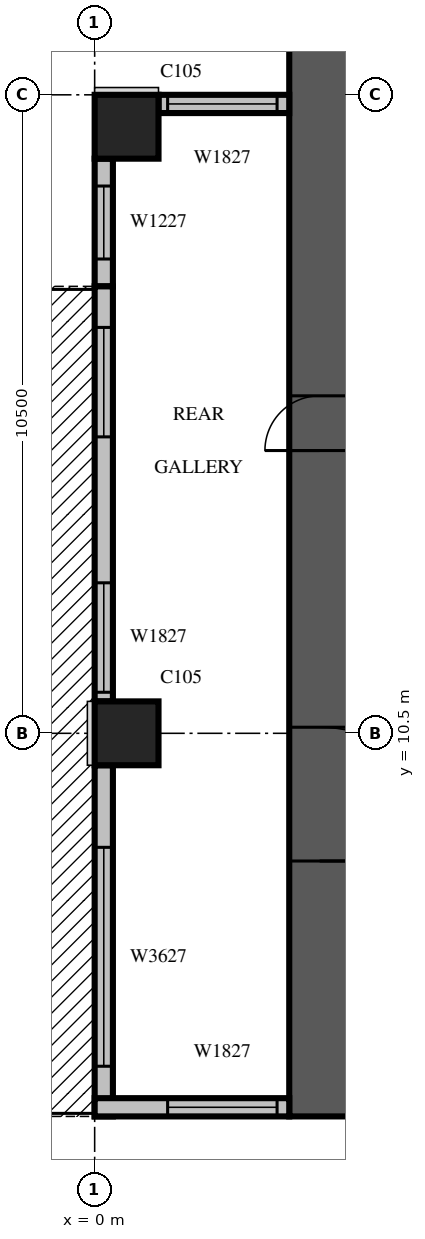
"""IFC4 building model, lengths in metres.
Left out: names, types, materials, properties, quantities, classifications, styles, units other than length and angle.
Written with IfcOpenShell. Run it as: python <this file> out.ifc"""

import sys

from ifc_helpers import new_model, si_unit, direction, frame, frame_2d, origin, origin_2d, place, context, subcontext, project, spatial, rectangle, extrude, source, transform, mapped, element, fill, save


model = new_model("IFC4")
c1 = context("Model", 3, precision=1e-05, world=origin(), true_north=direction((0.0, 1.0)))
c2 = subcontext(c1, "Body", "Model", "MODEL_VIEW")
j1 = project(units=[si_unit("LENGTHUNIT", "METRE"), si_unit("PLANEANGLEUNIT", "RADIAN")], contexts=[c1])
p1 = place(None, origin())
s1 = spatial("IfcSite", under=j1, at=p1, CompositionType="ELEMENT")
p2 = place(p1, origin())
s2 = spatial("IfcBuilding", under=s1, at=p2, CompositionType="ELEMENT")
p3 = place(p2, frame((0.0, 0.0, 124.5)))
s3 = spatial("IfcBuildingStorey", under=s2, at=p3, CompositionType="ELEMENT", Elevation=124.5)
m1 = source(origin(), c2, "Body", "SweptSolid", [
    extrude(rectangle(XDim=1.05, YDim=1.05, at=origin_2d()), origin(), (0.0, 0.0, 1.0), 4.2),
])
for number, where, z_axis, x_axis in (
    (1, (0.525, 10.5, 0.0), (0.0, 0.0, 1.0), (1.0, 0.0, 0.0)),
    (2, (0.525, 20.475, 0.0), (0.0, 0.0, 1.0), (1.0, 0.0, 0.0)),
):
    element("IfcColumn", number, at=place(p3, frame(where, z_axis=z_axis, x_axis=x_axis)), inside=s3, PredefinedType="COLUMN", context=c2, shape_type="MappedRepresentation", body=[
        mapped(m1, transform((0.0, 0.0, 0.0), scale=1.0)),
    ])
m2 = source(origin(), c2, "Body", "SweptSolid", [
    extrude(rectangle(XDim=17.8, YDim=1.0, at=frame_2d((8.9, 0.0))), origin(), (0.0, 0.0, 1.0), 4.2),
])
p4 = place(p3, frame((3.7, 4.2, 0.0), z_axis=(0.0, 0.0, 1.0), x_axis=(0.0, 1.0, 0.0)))
e3 = element("IfcWall", 3, at=p4, inside=s3, PredefinedType="SHEAR", context=c2, shape_type="MappedRepresentation", body=[
    mapped(m2, transform((0.0, 0.0, 0.0), scale=1.0)),
])
m3 = source(origin(), c2, "Body", "SweptSolid", [
    extrude(rectangle(XDim=2.2, YDim=2.1, at=frame_2d((1.1, 1.05))), frame((0.0, 0.51, 0.0), z_axis=(0.0, -1.0, 0.0), x_axis=(1.0, 0.0, 0.0)), (0.0, 0.0, 1.0), 1.02),
])
p5 = place(p4, frame((4.2, 0.0, 0.0)))
e4 = element("IfcOpeningElement", 4, at=p5, cuts=e3, PredefinedType="OPENING", context=c2, shape_type="MappedRepresentation", body=[
    mapped(m3, transform((0.0, 0.0, 0.0), scale=1.0)),
])
m4 = source(origin(), c2, "Body", "SweptSolid", [
    extrude(rectangle(XDim=0.9, YDim=2.1, at=frame_2d((0.45, 1.05))), frame((0.0, 0.51, 0.0), z_axis=(0.0, -1.0, 0.0), x_axis=(1.0, 0.0, 0.0)), (0.0, 0.0, 1.0), 1.02),
])
p6 = place(p4, frame((10.95, 0.0, 0.0)))
e5 = element("IfcOpeningElement", 5, at=p6, cuts=e3, PredefinedType="OPENING", context=c2, shape_type="MappedRepresentation", body=[
    mapped(m4, transform((0.0, 0.0, 0.0), scale=1.0)),
])
m5 = source(origin(), c2, "Body", "SweptSolid", [
    extrude(rectangle(XDim=2.15, YDim=0.3, at=frame_2d((1.075, 0.0))), origin(), (0.0, 0.0, 1.0), 3.8),
])
p7 = place(p3, frame((3.2, 20.85, 0.0), z_axis=(0.0, 0.0, 1.0), x_axis=(-1.0, 0.0, 0.0)))
e6 = element("IfcWall", 6, at=p7, inside=s3, PredefinedType="STANDARD", context=c2, shape_type="MappedRepresentation", body=[
    mapped(m5, transform((0.0, 0.0, 0.0), scale=1.0)),
])
m6 = source(origin(), c2, "Body", "SweptSolid", [
    extrude(rectangle(XDim=1.8, YDim=2.7, at=frame_2d((0.9, 1.35))), frame((0.0, 0.16, 0.0), z_axis=(0.0, -1.0, 0.0), x_axis=(1.0, 0.0, 0.0)), (0.0, 0.0, 1.0), 0.32),
])
p8 = place(p7, frame((0.2, 0.0, 0.6)))
e7 = element("IfcOpeningElement", 7, at=p8, cuts=e6, PredefinedType="OPENING", context=c2, shape_type="MappedRepresentation", body=[
    mapped(m6, transform((0.0, 0.0, 0.0), scale=1.0)),
])
m7 = source(origin(), c2, "Body", "SweptSolid", [
    extrude(rectangle(XDim=2.1, YDim=0.3, at=frame_2d((1.05, 0.0))), origin(), (0.0, 0.0, 1.0), 3.8),
])
p9 = place(p3, frame((0.15, 19.95, 0.0), z_axis=(0.0, 0.0, 1.0), x_axis=(0.0, -1.0, 0.0)))
e8 = element("IfcWall", 8, at=p9, inside=s3, PredefinedType="STANDARD", context=c2, shape_type="MappedRepresentation", body=[
    mapped(m7, transform((0.0, 0.0, 0.0), scale=1.0)),
])
m8 = source(origin(), c2, "Body", "SweptSolid", [
    extrude(rectangle(XDim=1.2, YDim=2.7, at=frame_2d((0.6, 1.35))), frame((0.0, 0.16, 0.0), z_axis=(0.0, -1.0, 0.0), x_axis=(1.0, 0.0, 0.0)), (0.0, 0.0, 1.0), 0.32),
])
p10 = place(p9, frame((0.45, 0.0, 0.6)))
e9 = element("IfcOpeningElement", 9, at=p10, cuts=e8, PredefinedType="OPENING", context=c2, shape_type="MappedRepresentation", body=[
    mapped(m8, transform((0.0, 0.0, 0.0), scale=1.0)),
])
m9 = source(origin(), c2, "Body", "SweptSolid", [
    extrude(rectangle(XDim=6.825, YDim=0.3, at=frame_2d((3.413, 0.0))), origin(), (0.0, 0.0, 1.0), 3.8),
])
p11 = place(p3, frame((0.15, 17.85, 0.0), z_axis=(0.0, 0.0, 1.0), x_axis=(0.0, -1.0, 0.0)))
e10 = element("IfcWall", 10, at=p11, inside=s3, PredefinedType="STANDARD", context=c2, shape_type="MappedRepresentation", body=[
    mapped(m9, transform((0.0, 0.0, 0.0), scale=1.0)),
])
m10 = source(origin(), c2, "Body", "SweptSolid", [
    extrude(rectangle(XDim=1.8, YDim=2.4, at=frame_2d((0.9, 1.2))), frame((0.0, 0.16, 0.0), z_axis=(0.0, -1.0, 0.0), x_axis=(1.0, 0.0, 0.0)), (0.0, 0.0, 1.0), 0.32),
])
p12 = place(p11, frame((0.675, 0.0, 0.0)))
e11 = element("IfcOpeningElement", 11, at=p12, cuts=e10, PredefinedType="OPENING", context=c2, shape_type="MappedRepresentation", body=[
    mapped(m10, transform((0.0, 0.0, 0.0), scale=1.0)),
])
p13 = place(p11, frame((4.875, 0.0, 0.6)))
e12 = element("IfcOpeningElement", 12, at=p13, cuts=e10, PredefinedType="OPENING", context=c2, shape_type="MappedRepresentation", body=[
    mapped(m6, transform((0.0, 0.0, 0.0), scale=1.0)),
])
m11 = source(origin(), c2, "Body", "SweptSolid", [
    extrude(rectangle(XDim=5.775, YDim=0.3, at=frame_2d((2.888, 0.0))), origin(), (0.0, 0.0, 1.0), 3.8),
])
p14 = place(p3, frame((0.15, 9.975, 0.0), z_axis=(0.0, 0.0, 1.0), x_axis=(0.0, -1.0, 0.0)))
e13 = element("IfcWall", 13, at=p14, inside=s3, PredefinedType="STANDARD", context=c2, shape_type="MappedRepresentation", body=[
    mapped(m11, transform((0.0, 0.0, 0.0), scale=1.0)),
])
m12 = source(origin(), c2, "Body", "SweptSolid", [
    extrude(rectangle(XDim=3.6, YDim=2.7, at=frame_2d((1.8, 1.35))), frame((0.0, 0.16, 0.0), z_axis=(0.0, -1.0, 0.0), x_axis=(1.0, 0.0, 0.0)), (0.0, 0.0, 1.0), 0.32),
])
p15 = place(p14, frame((1.35, 0.0, 0.6)))
e14 = element("IfcOpeningElement", 14, at=p15, cuts=e13, PredefinedType="OPENING", context=c2, shape_type="MappedRepresentation", body=[
    mapped(m12, transform((0.0, 0.0, 0.0), scale=1.0)),
])
m13 = source(origin(), c2, "Body", "SweptSolid", [
    extrude(rectangle(XDim=3.2, YDim=0.3, at=frame_2d((1.6, 0.0))), origin(), (0.0, 0.0, 1.0), 3.8),
])
p16 = place(p3, frame((0.0, 4.35, 0.0), z_axis=(0.0, 0.0, 1.0), x_axis=(1.0, 0.0, 0.0)))
e15 = element("IfcWall", 15, at=p16, inside=s3, PredefinedType="STANDARD", context=c2, shape_type="MappedRepresentation", body=[
    mapped(m13, transform((0.0, 0.0, 0.0), scale=1.0)),
])
p17 = place(p16, frame((1.2, 0.0, 0.6)))
e16 = element("IfcOpeningElement", 16, at=p17, cuts=e15, PredefinedType="OPENING", context=c2, shape_type="MappedRepresentation", body=[
    mapped(m6, transform((0.0, 0.0, 0.0), scale=1.0)),
])
m14 = source(origin(), c2, "Body", "SweptSolid", [
    extrude(rectangle(XDim=1.8, YDim=2.7, at=frame_2d((0.9, 1.35))), frame((0.0, 0.03, 0.0), z_axis=(0.0, -1.0, 0.0), x_axis=(1.0, 0.0, 0.0)), (0.0, 0.0, 1.0), 0.06),
])
p18 = place(p8, origin())
e17 = element("IfcWindow", 17, at=p18, inside=s3, PartitioningType="SINGLE_PANEL", PredefinedType="WINDOW", context=c2, shape_type="MappedRepresentation", body=[
    mapped(m14, transform((0.0, 0.0, 0.0), scale=1.0)),
])
fill(e7, e17)
m15 = source(origin(), c2, "Body", "SweptSolid", [
    extrude(rectangle(XDim=1.2, YDim=2.7, at=frame_2d((0.6, 1.35))), frame((0.0, 0.03, 0.0), z_axis=(0.0, -1.0, 0.0), x_axis=(1.0, 0.0, 0.0)), (0.0, 0.0, 1.0), 0.06),
])
p19 = place(p10, origin())
e18 = element("IfcWindow", 18, at=p19, inside=s3, PartitioningType="SINGLE_PANEL", PredefinedType="WINDOW", context=c2, shape_type="MappedRepresentation", body=[
    mapped(m15, transform((0.0, 0.0, 0.0), scale=1.0)),
])
fill(e9, e18)
m16 = source(origin(), c2, "Body", "SweptSolid", [
    extrude(rectangle(XDim=1.8, YDim=2.4, at=frame_2d((0.9, 1.2))), frame((0.0, 0.025, 0.0), z_axis=(0.0, -1.0, 0.0), x_axis=(1.0, 0.0, 0.0)), (0.0, 0.0, 1.0), 0.05),
])
p20 = place(p12, origin())
e19 = element("IfcDoor", 19, at=p20, inside=s3, OperationType="SLIDING_TO_LEFT", PredefinedType="DOOR", context=c2, shape_type="MappedRepresentation", body=[
    mapped(m16, transform((0.0, 0.0, 0.0), scale=1.0)),
])
fill(e11, e19)
p21 = place(p13, origin())
e20 = element("IfcWindow", 20, at=p21, inside=s3, PartitioningType="SINGLE_PANEL", PredefinedType="WINDOW", context=c2, shape_type="MappedRepresentation", body=[
    mapped(m14, transform((0.0, 0.0, 0.0), scale=1.0)),
])
fill(e12, e20)
m17 = source(origin(), c2, "Body", "SweptSolid", [
    extrude(rectangle(XDim=3.6, YDim=2.7, at=frame_2d((1.8, 1.35))), frame((0.0, 0.03, 0.0), z_axis=(0.0, -1.0, 0.0), x_axis=(1.0, 0.0, 0.0)), (0.0, 0.0, 1.0), 0.06),
])
p22 = place(p15, origin())
e21 = element("IfcWindow", 21, at=p22, inside=s3, PartitioningType="SINGLE_PANEL", PredefinedType="WINDOW", context=c2, shape_type="MappedRepresentation", body=[
    mapped(m17, transform((0.0, 0.0, 0.0), scale=1.0)),
])
fill(e14, e21)
p23 = place(p17, origin())
e22 = element("IfcWindow", 22, at=p23, inside=s3, PartitioningType="SINGLE_PANEL", PredefinedType="WINDOW", context=c2, shape_type="MappedRepresentation", body=[
    mapped(m14, transform((0.0, 0.0, 0.0), scale=1.0)),
])
fill(e16, e22)
m18 = source(origin(), c2, "Body", "SweptSolid", [
    extrude(rectangle(XDim=2.2, YDim=2.1, at=frame_2d((1.1, 1.05))), frame((0.0, 0.025, 0.0), z_axis=(0.0, -1.0, 0.0), x_axis=(1.0, 0.0, 0.0)), (0.0, 0.0, 1.0), 0.05),
])
p24 = place(p5, origin())
e23 = element("IfcDoor", 23, at=p24, inside=s3, OperationType="DOUBLE_DOOR_SINGLE_SWING", PredefinedType="DOOR", context=c2, shape_type="MappedRepresentation", body=[
    mapped(m18, transform((0.0, 0.0, 0.0), scale=1.0)),
])
fill(e4, e23)
m19 = source(origin(), c2, "Body", "SweptSolid", [
    extrude(rectangle(XDim=0.9, YDim=2.1, at=frame_2d((0.45, 1.05))), frame((0.0, 0.025, 0.0), z_axis=(0.0, -1.0, 0.0), x_axis=(1.0, 0.0, 0.0)), (0.0, 0.0, 1.0), 0.05),
])
p25 = place(p6, origin())
e24 = element("IfcDoor", 24, at=p25, inside=s3, OperationType="SINGLE_SWING_LEFT", PredefinedType="DOOR", context=c2, shape_type="MappedRepresentation", body=[
    mapped(m19, transform((0.0, 0.0, 0.0), scale=1.0)),
])
fill(e5, e24)
save(model, sys.argv[1])
